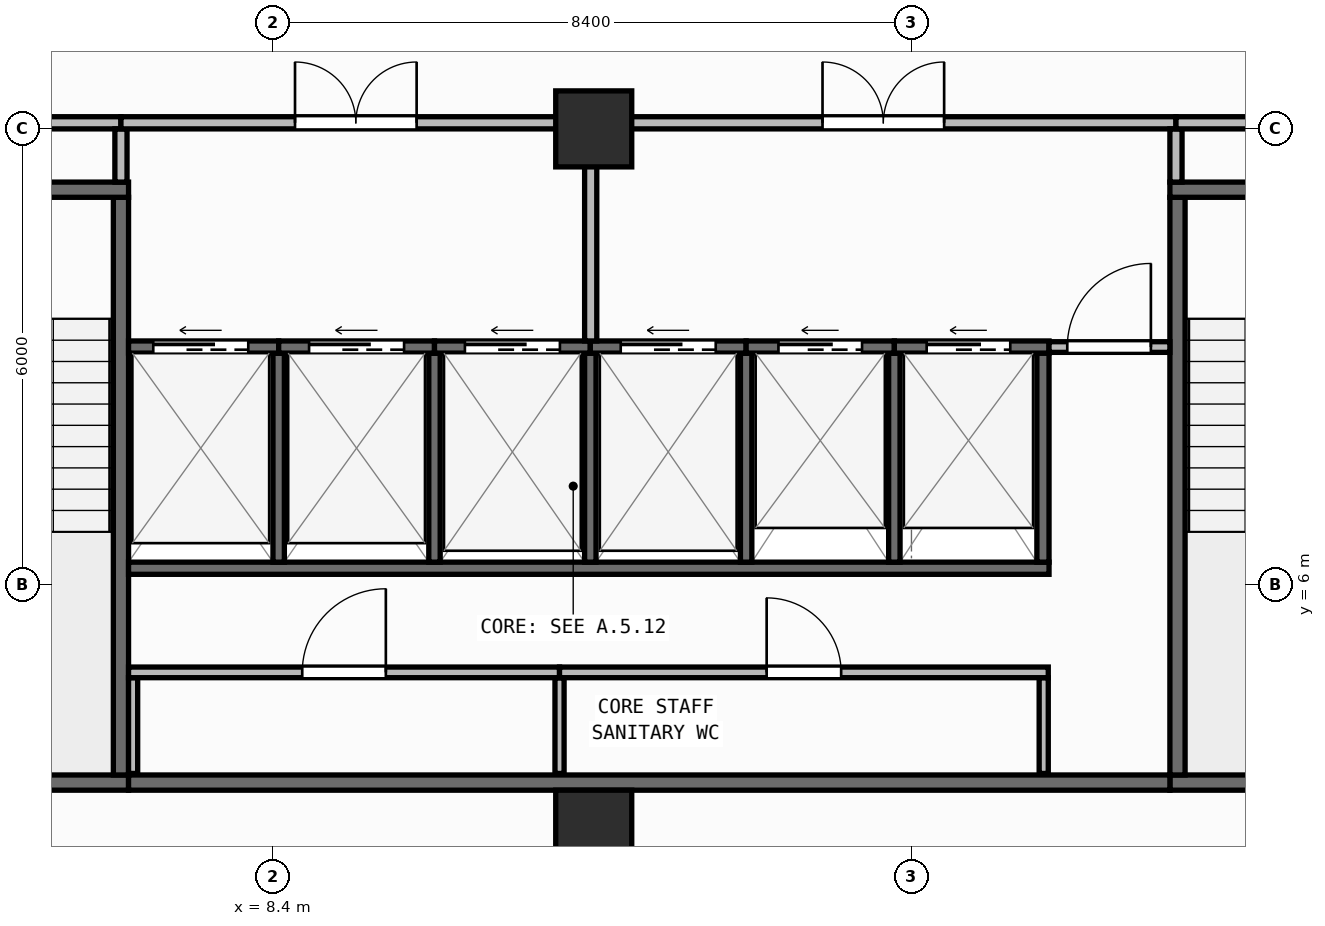
"""IFC4 building model, lengths in metres.
Left out: names, types, materials, properties, quantities, classifications, styles, units other than length and angle.
Written with IfcOpenShell. Run it as: python <this file> out.ifc"""

import sys

from ifc_helpers import new_model, si_unit, direction, frame, frame_2d, origin, origin_2d, place, context, subcontext, project, spatial, rectangle, extrude, element, fill, save


model = new_model("IFC4")
c1 = context("Model", 3, precision=1e-05, world=origin(), true_north=direction((0.0, 1.0)))
c2 = subcontext(c1, "Body", "Model", "MODEL_VIEW")
j1 = project(units=[si_unit("LENGTHUNIT", "METRE"), si_unit("PLANEANGLEUNIT", "RADIAN")], contexts=[c1])
p1 = place(None, origin())
s1 = spatial("IfcSite", under=j1, at=p1, CompositionType="ELEMENT")
p2 = place(p1, origin())
s2 = spatial("IfcBuilding", under=s1, at=p2, CompositionType="ELEMENT")
p3 = place(p2, frame((0.0, 0.0, 192.1)))
s3 = spatial("IfcBuildingStorey", under=s2, at=p3, CompositionType="ELEMENT", Elevation=192.1)
for number, where, z_axis, x_axis in (
    (1, (12.62, 2.8, 0.0), (0.0, 0.0, 1.0), (1.0, 0.0, 0.0)),
    (2, (12.62, 12.0, 0.0), (0.0, 0.0, 1.0), (1.0, 0.0, 0.0)),
):
    element("IfcColumn", number, at=place(p3, frame(where, z_axis=z_axis, x_axis=x_axis)), inside=s3, PredefinedType="COLUMN", context=c2, shape_type="SweptSolid", body=[
        extrude(rectangle(XDim=1.0, YDim=1.0, at=origin_2d()), origin(), (0.0, 0.0, 1.0), 3.95),
    ])
p4 = place(p3, frame((2.66, 0.174, 0.0), z_axis=(0.0, 0.0, 1.0), x_axis=(0.996634028439, 0.081979347142, 0.0)))
e3 = element("IfcWall", 3, at=p4, inside=s3, PredefinedType="STANDARD", context=c2, shape_type="SweptSolid", body=[
    extrude(rectangle(XDim=46.035, YDim=0.26, at=frame_2d((23.018, 0.0))), origin(), (0.0, 0.0, 1.0), 3.71),
])
p5 = place(p4, frame((21.817, 0.0, 0.9)))
e4 = element("IfcOpeningElement", 4, at=p5, cuts=e3, PredefinedType="OPENING", context=c2, shape_type="SweptSolid", body=[
    extrude(rectangle(XDim=2.4, YDim=1.65, at=frame_2d((1.2, 0.825))), frame((0.0, 0.14, 0.0), z_axis=(0.0, -1.0, 0.0), x_axis=(1.0, 0.0, 0.0)), (0.0, 0.0, 1.0), 0.28),
])
p6 = place(p3, frame((2.8, 3.4, 0.0), z_axis=(0.0, 0.0, 1.0), x_axis=(1.0, 0.0, 0.0)))
e5 = element("IfcWall", 5, at=p6, inside=s3, PredefinedType="SHEAR", context=c2, shape_type="SweptSolid", body=[
    extrude(rectangle(XDim=3.7, YDim=0.2, at=frame_2d((1.85, 0.0))), origin(), (0.0, 0.0, 1.0), 3.71),
])
p7 = place(p3, frame((6.4, 3.5, 0.0), z_axis=(0.0, 0.0, 1.0), x_axis=(0.0, 1.0, 0.0)))
e6 = element("IfcWall", 6, at=p7, inside=s3, PredefinedType="SHEAR", context=c2, shape_type="SweptSolid", body=[
    extrude(rectangle(XDim=7.6, YDim=0.2, at=frame_2d((3.8, 0.0))), origin(), (0.0, 0.0, 1.0), 3.71),
])
p8 = place(p3, frame((2.8, 11.2, 0.0), z_axis=(0.0, 0.0, 1.0), x_axis=(1.0, 0.0, 0.0)))
e7 = element("IfcWall", 7, at=p8, inside=s3, PredefinedType="SHEAR", context=c2, shape_type="SweptSolid", body=[
    extrude(rectangle(XDim=3.7, YDim=0.2, at=frame_2d((1.85, 0.0))), origin(), (0.0, 0.0, 1.0), 3.71),
])
p9 = place(p8, frame((1.2, 0.0, 0.0)))
e8 = element("IfcOpeningElement", 8, at=p9, cuts=e7, PredefinedType="OPENING", context=c2, shape_type="SweptSolid", body=[
    extrude(rectangle(XDim=1.3, YDim=2.15, at=frame_2d((0.65, 1.075))), frame((0.0, 0.11, 0.0), z_axis=(0.0, -1.0, 0.0), x_axis=(1.0, 0.0, 0.0)), (0.0, 0.0, 1.0), 0.22),
])
p10 = place(p3, frame((20.2, 3.4, 0.0), z_axis=(0.0, 0.0, 1.0), x_axis=(1.0, 0.0, 0.0)))
e9 = element("IfcWall", 9, at=p10, inside=s3, PredefinedType="SHEAR", context=c2, shape_type="SweptSolid", body=[
    extrude(rectangle(XDim=3.7, YDim=0.2, at=frame_2d((1.85, 0.0))), origin(), (0.0, 0.0, 1.0), 3.71),
])
p11 = place(p3, frame((20.3, 3.5, 0.0), z_axis=(0.0, 0.0, 1.0), x_axis=(0.0, 1.0, 0.0)))
e10 = element("IfcWall", 10, at=p11, inside=s3, PredefinedType="SHEAR", context=c2, shape_type="SweptSolid", body=[
    extrude(rectangle(XDim=7.6, YDim=0.2, at=frame_2d((3.8, 0.0))), origin(), (0.0, 0.0, 1.0), 3.71),
])
p12 = place(p3, frame((20.2, 11.2, 0.0), z_axis=(0.0, 0.0, 1.0), x_axis=(1.0, 0.0, 0.0)))
e11 = element("IfcWall", 11, at=p12, inside=s3, PredefinedType="SHEAR", context=c2, shape_type="SweptSolid", body=[
    extrude(rectangle(XDim=3.7, YDim=0.2, at=frame_2d((1.85, 0.0))), origin(), (0.0, 0.0, 1.0), 3.71),
])
p13 = place(p12, frame((1.2, 0.0, 0.0)))
e12 = element("IfcOpeningElement", 12, at=p13, cuts=e11, PredefinedType="OPENING", context=c2, shape_type="SweptSolid", body=[
    extrude(rectangle(XDim=1.3, YDim=2.15, at=frame_2d((0.65, 1.075))), frame((0.0, 0.11, 0.0), z_axis=(0.0, -1.0, 0.0), x_axis=(1.0, 0.0, 0.0)), (0.0, 0.0, 1.0), 0.22),
])
p14 = place(p3, frame((6.5, 3.4, 0.0), z_axis=(0.0, 0.0, 1.0), x_axis=(1.0, 0.0, 0.0)))
e13 = element("IfcWall", 13, at=p14, inside=s3, PredefinedType="SHEAR", context=c2, shape_type="SweptSolid", body=[
    extrude(rectangle(XDim=13.7, YDim=0.2, at=frame_2d((6.85, 0.0))), origin(), (0.0, 0.0, 1.0), 3.71),
])
p15 = place(p3, frame((6.5, 6.22, 0.0), z_axis=(0.0, 0.0, 1.0), x_axis=(1.0, 0.0, 0.0)))
e14 = element("IfcWall", 14, at=p15, inside=s3, PredefinedType="SHEAR", context=c2, shape_type="SweptSolid", body=[
    extrude(rectangle(XDim=12.11, YDim=0.16, at=frame_2d((6.055, 0.0))), origin(), (0.0, 0.0, 1.0), 3.71),
])
p16 = place(p3, frame((18.53, 6.3, 0.0), z_axis=(0.0, 0.0, 1.0), x_axis=(0.0, 1.0, 0.0)))
e15 = element("IfcWall", 15, at=p16, inside=s3, PredefinedType="SHEAR", context=c2, shape_type="SweptSolid", body=[
    extrude(rectangle(XDim=2.75, YDim=0.16, at=frame_2d((1.375, 0.0))), origin(), (0.0, 0.0, 1.0), 3.71),
])
for number, where, z_axis, x_axis in (
    (16, (8.475, 6.3, 0.0), (0.0, 0.0, 1.0), (0.0, 1.0, 0.0)),
    (17, (10.525, 6.3, 0.0), (0.0, 0.0, 1.0), (0.0, 1.0, 0.0)),
    (18, (12.575, 6.3, 0.0), (0.0, 0.0, 1.0), (0.0, 1.0, 0.0)),
    (19, (14.625, 6.3, 0.0), (0.0, 0.0, 1.0), (0.0, 1.0, 0.0)),
    (20, (16.575, 6.3, 0.0), (0.0, 0.0, 1.0), (0.0, 1.0, 0.0)),
):
    element("IfcWall", number, at=place(p3, frame(where, z_axis=z_axis, x_axis=x_axis)), inside=s3, PredefinedType="SHEAR", context=c2, shape_type="SweptSolid", body=[
        extrude(rectangle(XDim=2.75, YDim=0.15, at=frame_2d((1.375, 0.0))), origin(), (0.0, 0.0, 1.0), 3.71),
    ])
p17 = place(p3, frame((6.5, 9.13, 0.0), z_axis=(0.0, 0.0, 1.0), x_axis=(1.0, 0.0, 0.0)))
e21 = element("IfcWall", 21, at=p17, inside=s3, PredefinedType="SHEAR", context=c2, shape_type="SweptSolid", body=[
    extrude(rectangle(XDim=1.975, YDim=0.16, at=frame_2d((0.988, 0.0))), origin(), (0.0, 0.0, 1.0), 3.71),
])
p18 = place(p17, frame((0.325, 0.0, 0.0)))
e22 = element("IfcOpeningElement", 22, at=p18, cuts=e21, PredefinedType="OPENING", context=c2, shape_type="SweptSolid", body=[
    extrude(rectangle(XDim=1.25, YDim=2.15, at=frame_2d((0.625, 1.075))), frame((0.0, 0.09, 0.0), z_axis=(0.0, -1.0, 0.0), x_axis=(1.0, 0.0, 0.0)), (0.0, 0.0, 1.0), 0.18),
])
p19 = place(p3, frame((8.475, 9.13, 0.0), z_axis=(0.0, 0.0, 1.0), x_axis=(1.0, 0.0, 0.0)))
e23 = element("IfcWall", 23, at=p19, inside=s3, PredefinedType="SHEAR", context=c2, shape_type="SweptSolid", body=[
    extrude(rectangle(XDim=2.05, YDim=0.16, at=frame_2d((1.025, 0.0))), origin(), (0.0, 0.0, 1.0), 3.71),
])
p20 = place(p19, frame((0.4, 0.0, 0.0)))
e24 = element("IfcOpeningElement", 24, at=p20, cuts=e23, PredefinedType="OPENING", context=c2, shape_type="SweptSolid", body=[
    extrude(rectangle(XDim=1.25, YDim=2.15, at=frame_2d((0.625, 1.075))), frame((0.0, 0.09, 0.0), z_axis=(0.0, -1.0, 0.0), x_axis=(1.0, 0.0, 0.0)), (0.0, 0.0, 1.0), 0.18),
])
p21 = place(p3, frame((10.525, 9.13, 0.0), z_axis=(0.0, 0.0, 1.0), x_axis=(1.0, 0.0, 0.0)))
e25 = element("IfcWall", 25, at=p21, inside=s3, PredefinedType="SHEAR", context=c2, shape_type="SweptSolid", body=[
    extrude(rectangle(XDim=2.05, YDim=0.16, at=frame_2d((1.025, 0.0))), origin(), (0.0, 0.0, 1.0), 3.71),
])
p22 = place(p21, frame((0.4, 0.0, 0.0)))
e26 = element("IfcOpeningElement", 26, at=p22, cuts=e25, PredefinedType="OPENING", context=c2, shape_type="SweptSolid", body=[
    extrude(rectangle(XDim=1.25, YDim=2.15, at=frame_2d((0.625, 1.075))), frame((0.0, 0.09, 0.0), z_axis=(0.0, -1.0, 0.0), x_axis=(1.0, 0.0, 0.0)), (0.0, 0.0, 1.0), 0.18),
])
p23 = place(p3, frame((12.575, 9.13, 0.0), z_axis=(0.0, 0.0, 1.0), x_axis=(1.0, 0.0, 0.0)))
e27 = element("IfcWall", 27, at=p23, inside=s3, PredefinedType="SHEAR", context=c2, shape_type="SweptSolid", body=[
    extrude(rectangle(XDim=2.05, YDim=0.16, at=frame_2d((1.025, 0.0))), origin(), (0.0, 0.0, 1.0), 3.71),
])
p24 = place(p23, frame((0.4, 0.0, 0.0)))
e28 = element("IfcOpeningElement", 28, at=p24, cuts=e27, PredefinedType="OPENING", context=c2, shape_type="SweptSolid", body=[
    extrude(rectangle(XDim=1.25, YDim=2.15, at=frame_2d((0.625, 1.075))), frame((0.0, 0.09, 0.0), z_axis=(0.0, -1.0, 0.0), x_axis=(1.0, 0.0, 0.0)), (0.0, 0.0, 1.0), 0.18),
])
p25 = place(p3, frame((14.625, 9.13, 0.0), z_axis=(0.0, 0.0, 1.0), x_axis=(1.0, 0.0, 0.0)))
e29 = element("IfcWall", 29, at=p25, inside=s3, PredefinedType="SHEAR", context=c2, shape_type="SweptSolid", body=[
    extrude(rectangle(XDim=1.95, YDim=0.16, at=frame_2d((0.975, 0.0))), origin(), (0.0, 0.0, 1.0), 3.71),
])
p26 = place(p25, frame((0.425, 0.0, 0.0)))
e30 = element("IfcOpeningElement", 30, at=p26, cuts=e29, PredefinedType="OPENING", context=c2, shape_type="SweptSolid", body=[
    extrude(rectangle(XDim=1.1, YDim=2.15, at=frame_2d((0.55, 1.075))), frame((0.0, 0.09, 0.0), z_axis=(0.0, -1.0, 0.0), x_axis=(1.0, 0.0, 0.0)), (0.0, 0.0, 1.0), 0.18),
])
p27 = place(p3, frame((16.575, 9.13, 0.0), z_axis=(0.0, 0.0, 1.0), x_axis=(1.0, 0.0, 0.0)))
e31 = element("IfcWall", 31, at=p27, inside=s3, PredefinedType="SHEAR", context=c2, shape_type="SweptSolid", body=[
    extrude(rectangle(XDim=2.035, YDim=0.16, at=frame_2d((1.018, 0.0))), origin(), (0.0, 0.0, 1.0), 3.71),
])
p28 = place(p27, frame((0.425, 0.0, 0.0)))
e32 = element("IfcOpeningElement", 32, at=p28, cuts=e31, PredefinedType="OPENING", context=c2, shape_type="SweptSolid", body=[
    extrude(rectangle(XDim=1.1, YDim=2.15, at=frame_2d((0.55, 1.075))), frame((0.0, 0.09, 0.0), z_axis=(0.0, -1.0, 0.0), x_axis=(1.0, 0.0, 0.0)), (0.0, 0.0, 1.0), 0.18),
])
for number, where, z_axis, x_axis in (
    (33, (6.56, 3.52, 0.0), (0.0, 0.0, 1.0), (0.0, 1.0, 0.0)),
    (34, (12.17, 3.52, 0.0), (0.0, 0.0, 1.0), (0.0, 1.0, 0.0)),
    (35, (18.54, 3.52, 0.0), (0.0, 0.0, 1.0), (0.0, 1.0, 0.0)),
):
    element("IfcWall", number, at=place(p3, frame(where, z_axis=z_axis, x_axis=x_axis)), inside=s3, PredefinedType="PARTITIONING", context=c2, shape_type="SweptSolid", body=[
        extrude(rectangle(XDim=1.26, YDim=0.12, at=frame_2d((0.63, 0.0))), origin(), (0.0, 0.0, 1.0), 3.71),
    ])
p29 = place(p3, frame((6.5, 4.85, 0.0), z_axis=(0.0, 0.0, 1.0), x_axis=(1.0, 0.0, 0.0)))
e36 = element("IfcWall", 36, at=p29, inside=s3, PredefinedType="PARTITIONING", context=c2, shape_type="SweptSolid", body=[
    extrude(rectangle(XDim=5.67, YDim=0.14, at=frame_2d((2.835, 0.0))), origin(), (0.0, 0.0, 1.0), 3.71),
])
p30 = place(p29, frame((2.285, 0.0, 0.0)))
e37 = element("IfcOpeningElement", 37, at=p30, cuts=e36, PredefinedType="OPENING", context=c2, shape_type="SweptSolid", body=[
    extrude(rectangle(XDim=1.1, YDim=2.1, at=frame_2d((0.55, 1.05))), frame((0.0, 0.08, 0.0), z_axis=(0.0, -1.0, 0.0), x_axis=(1.0, 0.0, 0.0)), (0.0, 0.0, 1.0), 0.16),
])
p31 = place(p3, frame((12.17, 4.85, 0.0), z_axis=(0.0, 0.0, 1.0), x_axis=(1.0, 0.0, 0.0)))
e38 = element("IfcWall", 38, at=p31, inside=s3, PredefinedType="PARTITIONING", context=c2, shape_type="SweptSolid", body=[
    extrude(rectangle(XDim=6.43, YDim=0.14, at=frame_2d((3.215, 0.0))), origin(), (0.0, 0.0, 1.0), 3.71),
])
p32 = place(p31, frame((2.725, 0.0, 0.0)))
e39 = element("IfcOpeningElement", 39, at=p32, cuts=e38, PredefinedType="OPENING", context=c2, shape_type="SweptSolid", body=[
    extrude(rectangle(XDim=0.98, YDim=2.1, at=frame_2d((0.49, 1.05))), frame((0.0, 0.08, 0.0), z_axis=(0.0, -1.0, 0.0), x_axis=(1.0, 0.0, 0.0)), (0.0, 0.0, 1.0), 0.16),
])
p33 = place(p3, frame((18.61, 9.13, 0.0), z_axis=(0.0, 0.0, 1.0), x_axis=(1.0, 0.0, 0.0)))
e40 = element("IfcWall", 40, at=p33, inside=s3, PredefinedType="PARTITIONING", context=c2, shape_type="SweptSolid", body=[
    extrude(rectangle(XDim=1.59, YDim=0.14, at=frame_2d((0.795, 0.0))), origin(), (0.0, 0.0, 1.0), 3.71),
])
p34 = place(p33, frame((0.24, 0.0, 0.0)))
e41 = element("IfcOpeningElement", 41, at=p34, cuts=e40, PredefinedType="OPENING", context=c2, shape_type="SweptSolid", body=[
    extrude(rectangle(XDim=1.1, YDim=2.1, at=frame_2d((0.55, 1.05))), frame((0.0, 0.08, 0.0), z_axis=(0.0, -1.0, 0.0), x_axis=(1.0, 0.0, 0.0)), (0.0, 0.0, 1.0), 0.16),
])
p35 = place(p3, frame((2.8, 12.08, 0.0), z_axis=(0.0, 0.0, 1.0), x_axis=(1.0, 0.0, 0.0)))
e42 = element("IfcWall", 42, at=p35, inside=s3, PredefinedType="PARTITIONING", context=c2, shape_type="SweptSolid", body=[
    extrude(rectangle(XDim=3.6, YDim=0.16, at=frame_2d((1.8, 0.0))), origin(), (0.0, 0.0, 1.0), 3.152),
])
p36 = place(p35, frame((1.0, 0.0, 0.0)))
e43 = element("IfcOpeningElement", 43, at=p36, cuts=e42, PredefinedType="OPENING", context=c2, shape_type="SweptSolid", body=[
    extrude(rectangle(XDim=1.6, YDim=2.05, at=frame_2d((0.8, 1.025))), frame((0.0, 0.09, 0.0), z_axis=(0.0, -1.0, 0.0), x_axis=(1.0, 0.0, 0.0)), (0.0, 0.0, 1.0), 0.18),
])
p37 = place(p3, frame((6.4, 11.3, 0.0), z_axis=(0.0, 0.0, 1.0), x_axis=(0.0, 1.0, 0.0)))
e44 = element("IfcWall", 44, at=p37, inside=s3, PredefinedType="PARTITIONING", context=c2, shape_type="SweptSolid", body=[
    extrude(rectangle(XDim=0.7, YDim=0.16, at=frame_2d((0.35, 0.0))), origin(), (0.0, 0.0, 1.0), 3.71),
])
p38 = place(p3, frame((6.4, 12.08, 0.0), z_axis=(0.0, 0.0, 1.0), x_axis=(1.0, 0.0, 0.0)))
e45 = element("IfcWall", 45, at=p38, inside=s3, PredefinedType="PARTITIONING", context=c2, shape_type="SweptSolid", body=[
    extrude(rectangle(XDim=6.18, YDim=0.16, at=frame_2d((3.09, 0.0))), origin(), (0.0, 0.0, 1.0), 3.152),
])
p39 = place(p38, frame((2.29, 0.0, 0.0)))
e46 = element("IfcOpeningElement", 46, at=p39, cuts=e45, PredefinedType="OPENING", context=c2, shape_type="SweptSolid", body=[
    extrude(rectangle(XDim=1.6, YDim=2.05, at=frame_2d((0.8, 1.025))), frame((0.0, 0.09, 0.0), z_axis=(0.0, -1.0, 0.0), x_axis=(1.0, 0.0, 0.0)), (0.0, 0.0, 1.0), 0.18),
])
p40 = place(p3, frame((12.58, 9.21, 0.0), z_axis=(0.0, 0.0, 1.0), x_axis=(0.0, 1.0, 0.0)))
e47 = element("IfcWall", 47, at=p40, inside=s3, PredefinedType="PARTITIONING", context=c2, shape_type="SweptSolid", body=[
    extrude(rectangle(XDim=2.79, YDim=0.16, at=frame_2d((1.395, 0.0))), origin(), (0.0, 0.0, 1.0), 3.71),
])
p41 = place(p3, frame((12.58, 12.08, 0.0), z_axis=(0.0, 0.0, 1.0), x_axis=(1.0, 0.0, 0.0)))
e48 = element("IfcWall", 48, at=p41, inside=s3, PredefinedType="PARTITIONING", context=c2, shape_type="SweptSolid", body=[
    extrude(rectangle(XDim=7.7, YDim=0.16, at=frame_2d((3.85, 0.0))), origin(), (0.0, 0.0, 1.0), 3.152),
])
p42 = place(p41, frame((3.05, 0.0, 0.0)))
e49 = element("IfcOpeningElement", 49, at=p42, cuts=e48, PredefinedType="OPENING", context=c2, shape_type="SweptSolid", body=[
    extrude(rectangle(XDim=1.6, YDim=2.05, at=frame_2d((0.8, 1.025))), frame((0.0, 0.09, 0.0), z_axis=(0.0, -1.0, 0.0), x_axis=(1.0, 0.0, 0.0)), (0.0, 0.0, 1.0), 0.18),
])
p43 = place(p3, frame((20.28, 11.3, 0.0), z_axis=(0.0, 0.0, 1.0), x_axis=(0.0, 1.0, 0.0)))
e50 = element("IfcWall", 50, at=p43, inside=s3, PredefinedType="PARTITIONING", context=c2, shape_type="SweptSolid", body=[
    extrude(rectangle(XDim=0.7, YDim=0.16, at=frame_2d((0.35, 0.0))), origin(), (0.0, 0.0, 1.0), 3.71),
])
p44 = place(p3, frame((20.28, 12.08, 0.0), z_axis=(0.0, 0.0, 1.0), x_axis=(1.0, 0.0, 0.0)))
e51 = element("IfcWall", 51, at=p44, inside=s3, PredefinedType="PARTITIONING", context=c2, shape_type="SweptSolid", body=[
    extrude(rectangle(XDim=3.62, YDim=0.16, at=frame_2d((1.81, 0.0))), origin(), (0.0, 0.0, 1.0), 3.152),
])
p45 = place(p44, frame((1.01, 0.0, 0.0)))
e52 = element("IfcOpeningElement", 52, at=p45, cuts=e51, PredefinedType="OPENING", context=c2, shape_type="SweptSolid", body=[
    extrude(rectangle(XDim=1.6, YDim=2.05, at=frame_2d((0.8, 1.025))), frame((0.0, 0.09, 0.0), z_axis=(0.0, -1.0, 0.0), x_axis=(1.0, 0.0, 0.0)), (0.0, 0.0, 1.0), 0.18),
])
p46 = place(p18, origin())
e53 = element("IfcDoor", 53, at=p46, inside=s3, OperationType="SLIDING_TO_LEFT", PredefinedType="DOOR", context=c2, shape_type="SweptSolid", body=[
    extrude(rectangle(XDim=1.25, YDim=2.15, at=frame_2d((0.625, 1.075))), frame((0.0, 0.025, 0.0), z_axis=(0.0, -1.0, 0.0), x_axis=(1.0, 0.0, 0.0)), (0.0, 0.0, 1.0), 0.05),
])
fill(e22, e53)
p47 = place(p20, origin())
e54 = element("IfcDoor", 54, at=p47, inside=s3, OperationType="SLIDING_TO_LEFT", PredefinedType="DOOR", context=c2, shape_type="SweptSolid", body=[
    extrude(rectangle(XDim=1.25, YDim=2.15, at=frame_2d((0.625, 1.075))), frame((0.0, 0.025, 0.0), z_axis=(0.0, -1.0, 0.0), x_axis=(1.0, 0.0, 0.0)), (0.0, 0.0, 1.0), 0.05),
])
fill(e24, e54)
p48 = place(p22, origin())
e55 = element("IfcDoor", 55, at=p48, inside=s3, OperationType="SLIDING_TO_LEFT", PredefinedType="DOOR", context=c2, shape_type="SweptSolid", body=[
    extrude(rectangle(XDim=1.25, YDim=2.15, at=frame_2d((0.625, 1.075))), frame((0.0, 0.025, 0.0), z_axis=(0.0, -1.0, 0.0), x_axis=(1.0, 0.0, 0.0)), (0.0, 0.0, 1.0), 0.05),
])
fill(e26, e55)
p49 = place(p24, origin())
e56 = element("IfcDoor", 56, at=p49, inside=s3, OperationType="SLIDING_TO_LEFT", PredefinedType="DOOR", context=c2, shape_type="SweptSolid", body=[
    extrude(rectangle(XDim=1.25, YDim=2.15, at=frame_2d((0.625, 1.075))), frame((0.0, 0.025, 0.0), z_axis=(0.0, -1.0, 0.0), x_axis=(1.0, 0.0, 0.0)), (0.0, 0.0, 1.0), 0.05),
])
fill(e28, e56)
p50 = place(p26, origin())
e57 = element("IfcDoor", 57, at=p50, inside=s3, OperationType="SLIDING_TO_LEFT", PredefinedType="DOOR", context=c2, shape_type="SweptSolid", body=[
    extrude(rectangle(XDim=1.1, YDim=2.15, at=frame_2d((0.55, 1.075))), frame((0.0, 0.025, 0.0), z_axis=(0.0, -1.0, 0.0), x_axis=(1.0, 0.0, 0.0)), (0.0, 0.0, 1.0), 0.05),
])
fill(e30, e57)
p51 = place(p28, origin())
e58 = element("IfcDoor", 58, at=p51, inside=s3, OperationType="SLIDING_TO_LEFT", PredefinedType="DOOR", context=c2, shape_type="SweptSolid", body=[
    extrude(rectangle(XDim=1.1, YDim=2.15, at=frame_2d((0.55, 1.075))), frame((0.0, 0.025, 0.0), z_axis=(0.0, -1.0, 0.0), x_axis=(1.0, 0.0, 0.0)), (0.0, 0.0, 1.0), 0.05),
])
fill(e32, e58)
p52 = place(p30, origin())
e59 = element("IfcDoor", 59, at=p52, inside=s3, OperationType="SINGLE_SWING_RIGHT", PredefinedType="DOOR", context=c2, shape_type="SweptSolid", body=[
    extrude(rectangle(XDim=1.1, YDim=2.1, at=frame_2d((0.55, 1.05))), frame((0.0, 0.025, 0.0), z_axis=(0.0, -1.0, 0.0), x_axis=(1.0, 0.0, 0.0)), (0.0, 0.0, 1.0), 0.05),
])
fill(e37, e59)
p53 = place(p32, origin())
e60 = element("IfcDoor", 60, at=p53, inside=s3, OperationType="SINGLE_SWING_LEFT", PredefinedType="DOOR", context=c2, shape_type="SweptSolid", body=[
    extrude(rectangle(XDim=0.98, YDim=2.1, at=frame_2d((0.49, 1.05))), frame((0.0, 0.025, 0.0), z_axis=(0.0, -1.0, 0.0), x_axis=(1.0, 0.0, 0.0)), (0.0, 0.0, 1.0), 0.05),
])
fill(e39, e60)
p54 = place(p34, origin())
e61 = element("IfcDoor", 61, at=p54, inside=s3, OperationType="SINGLE_SWING_RIGHT", PredefinedType="DOOR", context=c2, shape_type="SweptSolid", body=[
    extrude(rectangle(XDim=1.1, YDim=2.1, at=frame_2d((0.55, 1.05))), frame((0.0, 0.025, 0.0), z_axis=(0.0, -1.0, 0.0), x_axis=(1.0, 0.0, 0.0)), (0.0, 0.0, 1.0), 0.05),
])
fill(e41, e61)
p55 = place(p39, origin())
e62 = element("IfcDoor", 62, at=p55, inside=s3, OperationType="DOUBLE_DOOR_SINGLE_SWING", PredefinedType="DOOR", context=c2, shape_type="SweptSolid", body=[
    extrude(rectangle(XDim=1.6, YDim=2.05, at=frame_2d((0.8, 1.025))), frame((0.0, 0.025, 0.0), z_axis=(0.0, -1.0, 0.0), x_axis=(1.0, 0.0, 0.0)), (0.0, 0.0, 1.0), 0.05),
])
fill(e46, e62)
p56 = place(p42, origin())
e63 = element("IfcDoor", 63, at=p56, inside=s3, OperationType="DOUBLE_DOOR_SINGLE_SWING", PredefinedType="DOOR", context=c2, shape_type="SweptSolid", body=[
    extrude(rectangle(XDim=1.6, YDim=2.05, at=frame_2d((0.8, 1.025))), frame((0.0, 0.025, 0.0), z_axis=(0.0, -1.0, 0.0), x_axis=(1.0, 0.0, 0.0)), (0.0, 0.0, 1.0), 0.05),
])
fill(e49, e63)
save(model, sys.argv[1])
